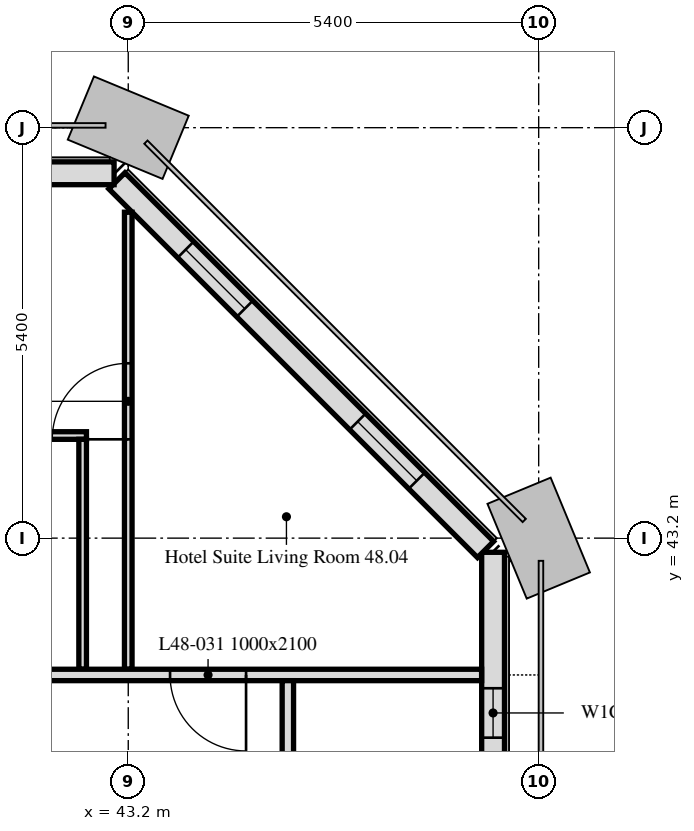
"""IFC4 building model, lengths in metres.
Left out: names, types, materials, properties, quantities, classifications, styles, units other than length and angle.
Written with IfcOpenShell. Run it as: python <this file> out.ifc"""

import sys

from ifc_helpers import new_model, si_unit, direction, frame, frame_2d, origin, place, context, subcontext, project, spatial, rectangle, extrude, element, fill, save


model = new_model("IFC4")
c1 = context("Model", 3, precision=1e-05, world=origin(), true_north=direction((0.0, 1.0)))
c2 = subcontext(c1, "Body", "Model", "MODEL_VIEW")
j1 = project(units=[si_unit("LENGTHUNIT", "METRE"), si_unit("PLANEANGLEUNIT", "RADIAN")], contexts=[c1])
p1 = place(None, origin())
s1 = spatial("IfcSite", under=j1, at=p1, CompositionType="ELEMENT")
p2 = place(p1, origin())
s2 = spatial("IfcBuilding", under=s1, at=p2, CompositionType="ELEMENT")
p3 = place(p2, frame((0.0, 0.0, 197.2)))
s3 = spatial("IfcBuildingStorey", under=s2, at=p3, CompositionType="ELEMENT", Elevation=197.2)
p4 = place(p3, frame((48.0, 10.986, 0.0), z_axis=(0.0, 0.0, 1.0), x_axis=(0.0, 1.0, 0.0)))
e1 = element("IfcWall", 1, at=p4, inside=s3, PredefinedType="SOLIDWALL", context=c2, shape_type="SweptSolid", body=[
    extrude(rectangle(XDim=32.027, YDim=0.3, at=frame_2d((16.014, 0.0))), origin(), (0.0, 0.0, 1.0), 3.0),
])
p5 = place(p4, frame((1.164, 0.0, 0.9)))
e2 = element("IfcOpeningElement", 2, at=p5, cuts=e1, PredefinedType="OPENING", context=c2, shape_type="SweptSolid", body=[
    extrude(rectangle(XDim=1.1, YDim=1.7, at=frame_2d((0.55, 0.85))), frame((0.0, 0.16, 0.0), z_axis=(0.0, -1.0, 0.0), x_axis=(1.0, 0.0, 0.0)), (0.0, 0.0, 1.0), 0.32),
])
p6 = place(p4, frame((2.764, 0.0, 0.9)))
e3 = element("IfcOpeningElement", 3, at=p6, cuts=e1, PredefinedType="OPENING", context=c2, shape_type="SweptSolid", body=[
    extrude(rectangle(XDim=1.1, YDim=1.7, at=frame_2d((0.55, 0.85))), frame((0.0, 0.16, 0.0), z_axis=(0.0, -1.0, 0.0), x_axis=(1.0, 0.0, 0.0)), (0.0, 0.0, 1.0), 0.32),
])
p7 = place(p4, frame((6.214, 0.0, 0.9)))
e4 = element("IfcOpeningElement", 4, at=p7, cuts=e1, PredefinedType="OPENING", context=c2, shape_type="SweptSolid", body=[
    extrude(rectangle(XDim=3.4, YDim=1.7, at=frame_2d((1.7, 0.85))), frame((0.0, 0.16, 0.0), z_axis=(0.0, -1.0, 0.0), x_axis=(1.0, 0.0, 0.0)), (0.0, 0.0, 1.0), 0.32),
])
p8 = place(p4, frame((11.964, 0.0, 0.9)))
e5 = element("IfcOpeningElement", 5, at=p8, cuts=e1, PredefinedType="OPENING", context=c2, shape_type="SweptSolid", body=[
    extrude(rectangle(XDim=1.1, YDim=1.7, at=frame_2d((0.55, 0.85))), frame((0.0, 0.16, 0.0), z_axis=(0.0, -1.0, 0.0), x_axis=(1.0, 0.0, 0.0)), (0.0, 0.0, 1.0), 0.32),
])
p9 = place(p4, frame((13.564, 0.0, 0.9)))
e6 = element("IfcOpeningElement", 6, at=p9, cuts=e1, PredefinedType="OPENING", context=c2, shape_type="SweptSolid", body=[
    extrude(rectangle(XDim=1.1, YDim=1.7, at=frame_2d((0.55, 0.85))), frame((0.0, 0.16, 0.0), z_axis=(0.0, -1.0, 0.0), x_axis=(1.0, 0.0, 0.0)), (0.0, 0.0, 1.0), 0.32),
])
p10 = place(p4, frame((17.014, 0.0, 0.9)))
e7 = element("IfcOpeningElement", 7, at=p10, cuts=e1, PredefinedType="OPENING", context=c2, shape_type="SweptSolid", body=[
    extrude(rectangle(XDim=3.4, YDim=1.7, at=frame_2d((1.7, 0.85))), frame((0.0, 0.16, 0.0), z_axis=(0.0, -1.0, 0.0), x_axis=(1.0, 0.0, 0.0)), (0.0, 0.0, 1.0), 0.32),
])
p11 = place(p4, frame((22.764, 0.0, 0.9)))
e8 = element("IfcOpeningElement", 8, at=p11, cuts=e1, PredefinedType="OPENING", context=c2, shape_type="SweptSolid", body=[
    extrude(rectangle(XDim=1.1, YDim=1.7, at=frame_2d((0.55, 0.85))), frame((0.0, 0.16, 0.0), z_axis=(0.0, -1.0, 0.0), x_axis=(1.0, 0.0, 0.0)), (0.0, 0.0, 1.0), 0.32),
])
p12 = place(p4, frame((24.364, 0.0, 0.9)))
e9 = element("IfcOpeningElement", 9, at=p12, cuts=e1, PredefinedType="OPENING", context=c2, shape_type="SweptSolid", body=[
    extrude(rectangle(XDim=1.1, YDim=1.7, at=frame_2d((0.55, 0.85))), frame((0.0, 0.16, 0.0), z_axis=(0.0, -1.0, 0.0), x_axis=(1.0, 0.0, 0.0)), (0.0, 0.0, 1.0), 0.32),
])
p13 = place(p4, frame((28.164, 0.0, 0.9)))
e10 = element("IfcOpeningElement", 10, at=p13, cuts=e1, PredefinedType="OPENING", context=c2, shape_type="SweptSolid", body=[
    extrude(rectangle(XDim=1.1, YDim=1.7, at=frame_2d((0.55, 0.85))), frame((0.0, 0.16, 0.0), z_axis=(0.0, -1.0, 0.0), x_axis=(1.0, 0.0, 0.0)), (0.0, 0.0, 1.0), 0.32),
])
p14 = place(p4, frame((29.589, 0.0, 0.9)))
e11 = element("IfcOpeningElement", 11, at=p14, cuts=e1, PredefinedType="OPENING", context=c2, shape_type="SweptSolid", body=[
    extrude(rectangle(XDim=0.65, YDim=1.7, at=frame_2d((0.325, 0.85))), frame((0.0, 0.16, 0.0), z_axis=(0.0, -1.0, 0.0), x_axis=(1.0, 0.0, 0.0)), (0.0, 0.0, 1.0), 0.32),
])
p15 = place(p3, frame((47.901, 43.051, 0.0), z_axis=(0.0, 0.0, 1.0), x_axis=(-0.707106781187, 0.707106781187, 0.0)))
e12 = element("IfcWall", 12, at=p15, inside=s3, PredefinedType="SOLIDWALL", context=c2, shape_type="SweptSolid", body=[
    extrude(rectangle(XDim=6.86, YDim=0.3, at=frame_2d((3.43, 0.0))), origin(), (0.0, 0.0, 1.0), 3.0),
])
p16 = place(p15, frame((1.28, 0.0, 0.9)))
e13 = element("IfcOpeningElement", 13, at=p16, cuts=e12, PredefinedType="OPENING", context=c2, shape_type="SweptSolid", body=[
    extrude(rectangle(XDim=1.1, YDim=1.7, at=frame_2d((0.55, 0.85))), frame((0.0, 0.16, 0.0), z_axis=(0.0, -1.0, 0.0), x_axis=(1.0, 0.0, 0.0)), (0.0, 0.0, 1.0), 0.32),
])
p17 = place(p15, frame((4.48, 0.0, 0.9)))
e14 = element("IfcOpeningElement", 14, at=p17, cuts=e12, PredefinedType="OPENING", context=c2, shape_type="SweptSolid", body=[
    extrude(rectangle(XDim=1.1, YDim=1.7, at=frame_2d((0.55, 0.85))), frame((0.0, 0.16, 0.0), z_axis=(0.0, -1.0, 0.0), x_axis=(1.0, 0.0, 0.0)), (0.0, 0.0, 1.0), 0.32),
])
p18 = place(p3, frame((43.014, 48.0, 0.0), z_axis=(0.0, 0.0, 1.0), x_axis=(-1.0, 0.0, 0.0)))
e15 = element("IfcWall", 15, at=p18, inside=s3, PredefinedType="SOLIDWALL", context=c2, shape_type="SweptSolid", body=[
    extrude(rectangle(XDim=32.027, YDim=0.3, at=frame_2d((16.014, 0.0))), origin(), (0.0, 0.0, 1.0), 3.0),
])
p19 = place(p18, frame((2.764, 0.0, 0.9)))
e16 = element("IfcOpeningElement", 16, at=p19, cuts=e15, PredefinedType="OPENING", context=c2, shape_type="SweptSolid", body=[
    extrude(rectangle(XDim=1.1, YDim=1.7, at=frame_2d((0.55, 0.85))), frame((0.0, 0.16, 0.0), z_axis=(0.0, -1.0, 0.0), x_axis=(1.0, 0.0, 0.0)), (0.0, 0.0, 1.0), 0.32),
])
p20 = place(p18, frame((6.214, 0.0, 0.9)))
e17 = element("IfcOpeningElement", 17, at=p20, cuts=e15, PredefinedType="OPENING", context=c2, shape_type="SweptSolid", body=[
    extrude(rectangle(XDim=3.4, YDim=1.7, at=frame_2d((1.7, 0.85))), frame((0.0, 0.16, 0.0), z_axis=(0.0, -1.0, 0.0), x_axis=(1.0, 0.0, 0.0)), (0.0, 0.0, 1.0), 0.32),
])
p21 = place(p18, frame((13.564, 0.0, 0.9)))
e18 = element("IfcOpeningElement", 18, at=p21, cuts=e15, PredefinedType="OPENING", context=c2, shape_type="SweptSolid", body=[
    extrude(rectangle(XDim=1.1, YDim=1.7, at=frame_2d((0.55, 0.85))), frame((0.0, 0.16, 0.0), z_axis=(0.0, -1.0, 0.0), x_axis=(1.0, 0.0, 0.0)), (0.0, 0.0, 1.0), 0.32),
])
p22 = place(p18, frame((17.014, 0.0, 0.9)))
e19 = element("IfcOpeningElement", 19, at=p22, cuts=e15, PredefinedType="OPENING", context=c2, shape_type="SweptSolid", body=[
    extrude(rectangle(XDim=3.4, YDim=1.7, at=frame_2d((1.7, 0.85))), frame((0.0, 0.16, 0.0), z_axis=(0.0, -1.0, 0.0), x_axis=(1.0, 0.0, 0.0)), (0.0, 0.0, 1.0), 0.32),
])
p23 = place(p18, frame((24.364, 0.0, 0.9)))
e20 = element("IfcOpeningElement", 20, at=p23, cuts=e15, PredefinedType="OPENING", context=c2, shape_type="SweptSolid", body=[
    extrude(rectangle(XDim=1.1, YDim=1.7, at=frame_2d((0.55, 0.85))), frame((0.0, 0.16, 0.0), z_axis=(0.0, -1.0, 0.0), x_axis=(1.0, 0.0, 0.0)), (0.0, 0.0, 1.0), 0.32),
])
p24 = place(p18, frame((27.814, 0.0, 0.9)))
e21 = element("IfcOpeningElement", 21, at=p24, cuts=e15, PredefinedType="OPENING", context=c2, shape_type="SweptSolid", body=[
    extrude(rectangle(XDim=3.4, YDim=1.7, at=frame_2d((1.7, 0.85))), frame((0.0, 0.16, 0.0), z_axis=(0.0, -1.0, 0.0), x_axis=(1.0, 0.0, 0.0)), (0.0, 0.0, 1.0), 0.32),
])
p25 = place(p3, frame((40.25, 44.55, 0.0), z_axis=(0.0, 0.0, 1.0), x_axis=(1.0, 0.0, 0.0)))
e22 = element("IfcWall", 22, at=p25, inside=s3, PredefinedType="PARTITIONING", context=c2, shape_type="SweptSolid", body=[
    extrude(rectangle(XDim=2.4, YDim=0.1, at=frame_2d((1.2, 0.0))), origin(), (0.0, 0.0, 1.0), 3.0),
])
p26 = place(p3, frame((42.6, 44.5, 0.0), z_axis=(0.0, 0.0, 1.0), x_axis=(0.0, -1.0, 0.0)))
e23 = element("IfcWall", 23, at=p26, inside=s3, PredefinedType="PARTITIONING", context=c2, shape_type="SweptSolid", body=[
    extrude(rectangle(XDim=3.025, YDim=0.1, at=frame_2d((1.512, 0.0))), origin(), (0.0, 0.0, 1.0), 3.0),
])
p27 = place(p3, frame((43.2, 41.475, 0.0), z_axis=(0.0, 0.0, 1.0), x_axis=(0.0, 1.0, 0.0)))
e24 = element("IfcWall", 24, at=p27, inside=s3, PredefinedType="PARTITIONING", context=c2, shape_type="SweptSolid", body=[
    extrude(rectangle(XDim=6.013, YDim=0.1, at=frame_2d((3.006, 0.0))), origin(), (0.0, 0.0, 1.0), 3.0),
])
p28 = place(p27, frame((3.025, 0.0, 0.0)))
e25 = element("IfcOpeningElement", 25, at=p28, cuts=e24, PredefinedType="OPENING", context=c2, shape_type="SweptSolid", body=[
    extrude(rectangle(XDim=1.0, YDim=2.1, at=frame_2d((0.5, 1.05))), frame((0.0, 0.05, 0.0), z_axis=(0.0, -1.0, 0.0), x_axis=(1.0, 0.0, 0.0)), (0.0, 0.0, 1.0), 0.1),
])
p29 = place(p3, frame((47.849, 41.4, 0.0), z_axis=(0.0, 0.0, 1.0), x_axis=(-1.0, 0.0, 0.0)))
e26 = element("IfcWall", 26, at=p29, inside=s3, PredefinedType="PARTITIONING", context=c2, shape_type="SweptSolid", body=[
    extrude(rectangle(XDim=41.698, YDim=0.15, at=frame_2d((20.849, 0.0))), origin(), (0.0, 0.0, 1.0), 2.4),
])
p30 = place(p29, frame((39.249, 0.0, 0.0)))
e27 = element("IfcOpeningElement", 27, at=p30, cuts=e26, PredefinedType="OPENING", context=c2, shape_type="SweptSolid", body=[
    extrude(rectangle(XDim=1.0, YDim=2.1, at=frame_2d((0.5, 1.05))), frame((0.0, 0.075, 0.0), z_axis=(0.0, -1.0, 0.0), x_axis=(1.0, 0.0, 0.0)), (0.0, 0.0, 1.0), 0.15),
])
p31 = place(p29, frame((11.449, 0.0, 0.0)))
e28 = element("IfcOpeningElement", 28, at=p31, cuts=e26, PredefinedType="OPENING", context=c2, shape_type="SweptSolid", body=[
    extrude(rectangle(XDim=1.0, YDim=2.1, at=frame_2d((0.5, 1.05))), frame((0.0, 0.075, 0.0), z_axis=(0.0, -1.0, 0.0), x_axis=(1.0, 0.0, 0.0)), (0.0, 0.0, 1.0), 0.15),
])
p32 = place(p29, frame((3.099, 0.0, 0.0)))
e29 = element("IfcOpeningElement", 29, at=p32, cuts=e26, PredefinedType="OPENING", context=c2, shape_type="SweptSolid", body=[
    extrude(rectangle(XDim=1.0, YDim=2.1, at=frame_2d((0.5, 1.05))), frame((0.0, 0.075, 0.0), z_axis=(0.0, -1.0, 0.0), x_axis=(1.0, 0.0, 0.0)), (0.0, 0.0, 1.0), 0.15),
])
p33 = place(p29, frame((23.049, 0.0, 0.0)))
e30 = element("IfcOpeningElement", 30, at=p33, cuts=e26, PredefinedType="OPENING", context=c2, shape_type="SweptSolid", body=[
    extrude(rectangle(XDim=1.0, YDim=2.1, at=frame_2d((0.5, 1.05))), frame((0.0, 0.075, 0.0), z_axis=(0.0, -1.0, 0.0), x_axis=(1.0, 0.0, 0.0)), (0.0, 0.0, 1.0), 0.15),
])
p34 = place(p3, frame((45.3, 41.325, 0.0), z_axis=(0.0, 0.0, 1.0), x_axis=(0.0, -1.0, 0.0)))
e31 = element("IfcWall", 31, at=p34, inside=s3, PredefinedType="PARTITIONING", context=c2, shape_type="SweptSolid", body=[
    extrude(rectangle(XDim=29.55, YDim=0.15, at=frame_2d((14.775, 0.0))), origin(), (0.0, 0.0, 1.0), 2.4),
])
p35 = place(p34, frame((5.467, 0.0, 0.0)))
e32 = element("IfcOpeningElement", 32, at=p35, cuts=e31, PredefinedType="OPENING", context=c2, shape_type="SweptSolid", body=[
    extrude(rectangle(XDim=1.0, YDim=2.1, at=frame_2d((0.5, 1.05))), frame((0.0, 0.075, 0.0), z_axis=(0.0, -1.0, 0.0), x_axis=(1.0, 0.0, 0.0)), (0.0, 0.0, 1.0), 0.15),
])
p36 = place(p34, frame((11.125, 0.0, 0.0)))
e33 = element("IfcOpeningElement", 33, at=p36, cuts=e31, PredefinedType="OPENING", context=c2, shape_type="SweptSolid", body=[
    extrude(rectangle(XDim=1.0, YDim=2.1, at=frame_2d((0.5, 1.05))), frame((0.0, 0.075, 0.0), z_axis=(0.0, -1.0, 0.0), x_axis=(1.0, 0.0, 0.0)), (0.0, 0.0, 1.0), 0.15),
])
p37 = place(p34, frame((26.875, 0.0, 0.0)))
e34 = element("IfcOpeningElement", 34, at=p37, cuts=e31, PredefinedType="OPENING", context=c2, shape_type="SweptSolid", body=[
    extrude(rectangle(XDim=1.0, YDim=2.1, at=frame_2d((0.5, 1.05))), frame((0.0, 0.075, 0.0), z_axis=(0.0, -1.0, 0.0), x_axis=(1.0, 0.0, 0.0)), (0.0, 0.0, 1.0), 0.15),
])
p38 = place(p34, frame((20.575, 0.0, 0.0)))
e35 = element("IfcOpeningElement", 35, at=p38, cuts=e31, PredefinedType="OPENING", context=c2, shape_type="SweptSolid", body=[
    extrude(rectangle(XDim=1.0, YDim=2.1, at=frame_2d((0.5, 1.05))), frame((0.0, 0.075, 0.0), z_axis=(0.0, -1.0, 0.0), x_axis=(1.0, 0.0, 0.0)), (0.0, 0.0, 1.0), 0.15),
])
p39 = place(p14, origin())
e36 = element("IfcWindow", 36, at=p39, inside=s3, PartitioningType="SINGLE_PANEL", PredefinedType="WINDOW", context=c2, shape_type="SweptSolid", body=[
    extrude(rectangle(XDim=0.65, YDim=1.7, at=frame_2d((0.325, 0.85))), frame((0.0, 0.03, 0.0), z_axis=(0.0, -1.0, 0.0), x_axis=(1.0, 0.0, 0.0)), (0.0, 0.0, 1.0), 0.06),
])
fill(e11, e36)
p40 = place(p16, origin())
e37 = element("IfcWindow", 37, at=p40, inside=s3, PartitioningType="SINGLE_PANEL", PredefinedType="WINDOW", context=c2, shape_type="SweptSolid", body=[
    extrude(rectangle(XDim=1.1, YDim=1.7, at=frame_2d((0.55, 0.85))), frame((0.0, 0.03, 0.0), z_axis=(0.0, -1.0, 0.0), x_axis=(1.0, 0.0, 0.0)), (0.0, 0.0, 1.0), 0.06),
])
fill(e13, e37)
p41 = place(p17, origin())
e38 = element("IfcWindow", 38, at=p41, inside=s3, PartitioningType="SINGLE_PANEL", PredefinedType="WINDOW", context=c2, shape_type="SweptSolid", body=[
    extrude(rectangle(XDim=1.1, YDim=1.7, at=frame_2d((0.55, 0.85))), frame((0.0, 0.03, 0.0), z_axis=(0.0, -1.0, 0.0), x_axis=(1.0, 0.0, 0.0)), (0.0, 0.0, 1.0), 0.06),
])
fill(e14, e38)
p42 = place(p28, origin())
e39 = element("IfcDoor", 39, at=p42, inside=s3, OperationType="SINGLE_SWING_LEFT", PredefinedType="DOOR", context=c2, shape_type="SweptSolid", body=[
    extrude(rectangle(XDim=1.0, YDim=2.1, at=frame_2d((0.5, 1.05))), frame((0.0, 0.025, 0.0), z_axis=(0.0, -1.0, 0.0), x_axis=(1.0, 0.0, 0.0)), (0.0, 0.0, 1.0), 0.05),
])
fill(e25, e39)
p43 = place(p32, origin())
e40 = element("IfcDoor", 40, at=p43, inside=s3, OperationType="SINGLE_SWING_LEFT", PredefinedType="DOOR", context=c2, shape_type="SweptSolid", body=[
    extrude(rectangle(XDim=1.0, YDim=2.1, at=frame_2d((0.5, 1.05))), frame((0.0, 0.025, 0.0), z_axis=(0.0, -1.0, 0.0), x_axis=(1.0, 0.0, 0.0)), (0.0, 0.0, 1.0), 0.05),
])
fill(e29, e40)
save(model, sys.argv[1])
